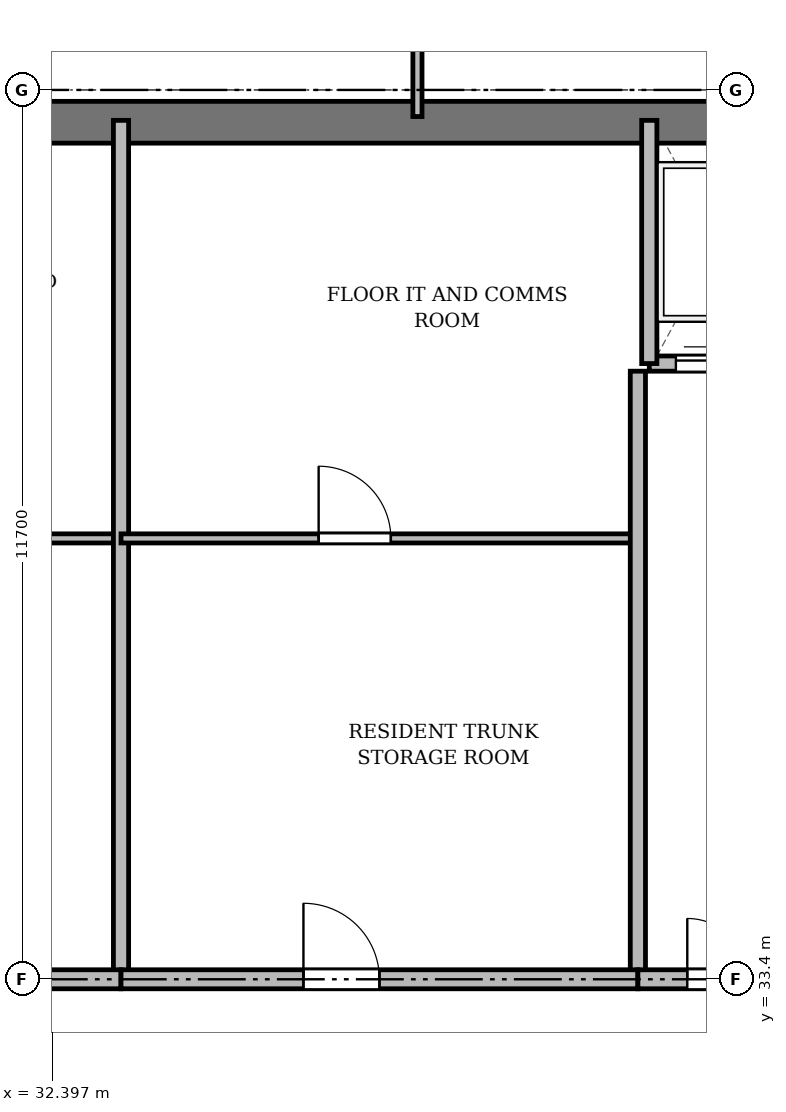
"""IFC4 building model, lengths in metres.
Left out: names, types, materials, properties, quantities, classifications, styles, units other than length and angle.
Written with IfcOpenShell. Run it as: python <this file> out.ifc"""

import sys

from ifc_helpers import new_model, si_unit, direction, frame, frame_2d, origin, place, context, subcontext, project, spatial, rectangle, extrude, source, transform, mapped, element, fill, save


model = new_model("IFC4")
c1 = context("Model", 3, precision=1e-05, world=origin(), true_north=direction((0.0, 1.0)))
c2 = subcontext(c1, "Body", "Model", "MODEL_VIEW")
j1 = project(units=[si_unit("LENGTHUNIT", "METRE"), si_unit("PLANEANGLEUNIT", "RADIAN")], contexts=[c1])
p1 = place(None, origin())
s1 = spatial("IfcSite", under=j1, at=p1, CompositionType="ELEMENT")
p2 = place(p1, origin())
s2 = spatial("IfcBuilding", under=s1, at=p2, CompositionType="ELEMENT")
p3 = place(p2, frame((0.0, 0.0, 230.1)))
s3 = spatial("IfcBuildingStorey", under=s2, at=p3, CompositionType="ELEMENT", Elevation=230.1)
p4 = place(p3, frame((15.65, 44.675, 0.0), z_axis=(0.0, 0.0, 1.0), x_axis=(1.0, 0.0, 0.0)))
e1 = element("IfcWall", 1, at=p4, inside=s3, PredefinedType="SHEAR", context=c2, shape_type="SweptSolid", body=[
    extrude(rectangle(XDim=43.1, YDim=0.55, at=frame_2d((21.55, 0.0))), origin(), (0.0, 0.0, 1.0), 3.36),
])
p5 = place(p3, frame((26.3, 39.2, 0.0), z_axis=(0.0, 0.0, 1.0), x_axis=(1.0, 0.0, 0.0)))
e2 = element("IfcWall", 2, at=p5, inside=s3, PredefinedType="PARTITIONING", context=c2, shape_type="SweptSolid", body=[
    extrude(rectangle(XDim=7.0, YDim=0.12, at=frame_2d((3.5, 0.0))), origin(), (0.0, 0.0, 1.0), 2.86),
])
p6 = place(p5, frame((2.6, 0.0, 0.0)))
e3 = element("IfcOpeningElement", 3, at=p6, cuts=e2, PredefinedType="OPENING", context=c2, shape_type="SweptSolid", body=[
    extrude(rectangle(XDim=0.95, YDim=2.15, at=frame_2d((0.475, 1.075))), frame((0.0, 0.07, 0.0), z_axis=(0.0, -1.0, 0.0), x_axis=(1.0, 0.0, 0.0)), (0.0, 0.0, 1.0), 0.14),
])
p7 = place(p3, frame((33.3, 33.4, 0.0), z_axis=(0.0, 0.0, 1.0), x_axis=(0.0, 1.0, 0.0)))
e4 = element("IfcWall", 4, at=p7, inside=s3, PredefinedType="SOLIDWALL", context=c2, shape_type="SweptSolid", body=[
    extrude(rectangle(XDim=11.3, YDim=0.2, at=frame_2d((5.65, 0.0))), origin(), (0.0, 0.0, 1.0), 2.91),
])
p8 = place(p3, frame((33.3, 39.2, 0.0), z_axis=(0.0, 0.0, 1.0), x_axis=(1.0, 0.0, 0.0)))
e5 = element("IfcWall", 5, at=p8, inside=s3, PredefinedType="PARTITIONING", context=c2, shape_type="SweptSolid", body=[
    extrude(rectangle(XDim=6.8, YDim=0.12, at=frame_2d((3.4, 0.0))), origin(), (0.0, 0.0, 1.0), 3.36),
])
p9 = place(p8, frame((2.6, 0.0, 0.0)))
e6 = element("IfcOpeningElement", 6, at=p9, cuts=e5, PredefinedType="OPENING", context=c2, shape_type="SweptSolid", body=[
    extrude(rectangle(XDim=0.95, YDim=2.15, at=frame_2d((0.475, 1.075))), frame((0.0, 0.07, 0.0), z_axis=(0.0, -1.0, 0.0), x_axis=(1.0, 0.0, 0.0)), (0.0, 0.0, 1.0), 0.14),
])
p10 = place(p3, frame((40.1, 33.4, 0.0), z_axis=(0.0, 0.0, 1.0), x_axis=(0.0, 1.0, 0.0)))
e7 = element("IfcWall", 7, at=p10, inside=s3, PredefinedType="SOLIDWALL", context=c2, shape_type="SweptSolid", body=[
    extrude(rectangle(XDim=8.0, YDim=0.2, at=frame_2d((4.0, 0.0))), origin(), (0.0, 0.0, 1.0), 2.91),
])
p11 = place(p3, frame((40.25, 41.5, 0.0), z_axis=(0.0, 0.0, 1.0), x_axis=(1.0, 0.0, 0.0)))
e8 = element("IfcWall", 8, at=p11, inside=s3, PredefinedType="SOLIDWALL", context=c2, shape_type="SweptSolid", body=[
    extrude(rectangle(XDim=6.9, YDim=0.2, at=frame_2d((3.45, 0.0))), origin(), (0.0, 0.0, 1.0), 3.36),
])
p12 = place(p11, frame((0.35, 0.0, 0.0)))
e9 = element("IfcOpeningElement", 9, at=p12, cuts=e8, PredefinedType="OPENING", context=c2, shape_type="SweptSolid", body=[
    extrude(rectangle(XDim=1.05, YDim=2.15, at=frame_2d((0.525, 1.075))), frame((0.0, 0.11, 0.0), z_axis=(0.0, -1.0, 0.0), x_axis=(1.0, 0.0, 0.0)), (0.0, 0.0, 1.0), 0.22),
])
p13 = place(p11, frame((2.05, 0.0, 0.0)))
e10 = element("IfcOpeningElement", 10, at=p13, cuts=e8, PredefinedType="OPENING", context=c2, shape_type="SweptSolid", body=[
    extrude(rectangle(XDim=1.05, YDim=2.15, at=frame_2d((0.525, 1.075))), frame((0.0, 0.11, 0.0), z_axis=(0.0, -1.0, 0.0), x_axis=(1.0, 0.0, 0.0)), (0.0, 0.0, 1.0), 0.22),
])
p14 = place(p11, frame((3.75, 0.0, 0.0)))
e11 = element("IfcOpeningElement", 11, at=p14, cuts=e8, PredefinedType="OPENING", context=c2, shape_type="SweptSolid", body=[
    extrude(rectangle(XDim=1.05, YDim=2.15, at=frame_2d((0.525, 1.075))), frame((0.0, 0.11, 0.0), z_axis=(0.0, -1.0, 0.0), x_axis=(1.0, 0.0, 0.0)), (0.0, 0.0, 1.0), 0.22),
])
p15 = place(p11, frame((5.45, 0.0, 0.0)))
e12 = element("IfcOpeningElement", 12, at=p15, cuts=e8, PredefinedType="OPENING", context=c2, shape_type="SweptSolid", body=[
    extrude(rectangle(XDim=1.05, YDim=2.15, at=frame_2d((0.525, 1.075))), frame((0.0, 0.11, 0.0), z_axis=(0.0, -1.0, 0.0), x_axis=(1.0, 0.0, 0.0)), (0.0, 0.0, 1.0), 0.22),
])
p16 = place(p3, frame((40.25, 41.5, 0.0), z_axis=(0.0, 0.0, 1.0), x_axis=(0.0, 1.0, 0.0)))
e13 = element("IfcWall", 13, at=p16, inside=s3, PredefinedType="SOLIDWALL", context=c2, shape_type="SweptSolid", body=[
    extrude(rectangle(XDim=3.2, YDim=0.2, at=frame_2d((1.6, 0.0))), origin(), (0.0, 0.0, 1.0), 3.36),
])
p17 = place(p3, frame((26.3, 33.4, 0.0), z_axis=(0.0, 0.0, 1.0), x_axis=(1.0, 0.0, 0.0)))
e14 = element("IfcWall", 14, at=p17, inside=s3, PredefinedType="PARTITIONING", context=c2, shape_type="SweptSolid", body=[
    extrude(rectangle(XDim=7.0, YDim=0.25, at=frame_2d((3.5, 0.0))), origin(), (0.0, 0.0, 1.0), 2.91),
])
p18 = place(p17, frame((1.35, 0.0, 0.0)))
e15 = element("IfcOpeningElement", 15, at=p18, cuts=e14, PredefinedType="OPENING", context=c2, shape_type="SweptSolid", body=[
    extrude(rectangle(XDim=0.95, YDim=2.15, at=frame_2d((0.475, 1.075))), frame((0.0, 0.135, 0.0), z_axis=(0.0, -1.0, 0.0), x_axis=(1.0, 0.0, 0.0)), (0.0, 0.0, 1.0), 0.27),
])
p19 = place(p3, frame((33.3, 33.4, 0.0), z_axis=(0.0, 0.0, 1.0), x_axis=(1.0, 0.0, 0.0)))
e16 = element("IfcWall", 16, at=p19, inside=s3, PredefinedType="PARTITIONING", context=c2, shape_type="SweptSolid", body=[
    extrude(rectangle(XDim=6.8, YDim=0.25, at=frame_2d((3.4, 0.0))), origin(), (0.0, 0.0, 1.0), 2.91),
])
p20 = place(p19, frame((2.4, 0.0, 0.0)))
e17 = element("IfcOpeningElement", 17, at=p20, cuts=e16, PredefinedType="OPENING", context=c2, shape_type="SweptSolid", body=[
    extrude(rectangle(XDim=1.0, YDim=2.15, at=frame_2d((0.5, 1.075))), frame((0.0, 0.135, 0.0), z_axis=(0.0, -1.0, 0.0), x_axis=(1.0, 0.0, 0.0)), (0.0, 0.0, 1.0), 0.27),
])
p21 = place(p3, frame((40.1, 33.4, 0.0), z_axis=(0.0, 0.0, 1.0), x_axis=(1.0, 0.0, 0.0)))
e18 = element("IfcWall", 18, at=p21, inside=s3, PredefinedType="PARTITIONING", context=c2, shape_type="SweptSolid", body=[
    extrude(rectangle(XDim=7.05, YDim=0.25, at=frame_2d((3.525, 0.0))), origin(), (0.0, 0.0, 1.0), 2.91),
])
p22 = place(p21, frame((0.65, 0.0, 0.0)))
e19 = element("IfcOpeningElement", 19, at=p22, cuts=e18, PredefinedType="OPENING", context=c2, shape_type="SweptSolid", body=[
    extrude(rectangle(XDim=1.6, YDim=2.2, at=frame_2d((0.8, 1.1))), frame((0.0, 0.135, 0.0), z_axis=(0.0, -1.0, 0.0), x_axis=(1.0, 0.0, 0.0)), (0.0, 0.0, 1.0), 0.27),
])
p23 = place(p3, frame((37.2, 44.75, 0.0), z_axis=(0.0, 0.0, 1.0), x_axis=(0.0, 1.0, 0.0)))
e20 = element("IfcWall", 20, at=p23, inside=s3, PredefinedType="PARTITIONING", context=c2, shape_type="SweptSolid", body=[
    extrude(rectangle(XDim=3.61, YDim=0.12, at=frame_2d((1.805, 0.0))), origin(), (0.0, 0.0, 1.0), 2.91),
])
p24 = place(p23, frame((1.1, 0.0, 0.0)))
e21 = element("IfcOpeningElement", 21, at=p24, cuts=e20, PredefinedType="OPENING", context=c2, shape_type="SweptSolid", body=[
    extrude(rectangle(XDim=0.95, YDim=2.15, at=frame_2d((0.475, 1.075))), frame((0.0, 0.07, 0.0), z_axis=(0.0, -1.0, 0.0), x_axis=(1.0, 0.0, 0.0)), (0.0, 0.0, 1.0), 0.14),
])
m1 = source(origin(), c2, "Body", "SweptSolid", [
    extrude(rectangle(XDim=0.95, YDim=2.15, at=frame_2d((0.475, 1.075))), frame((0.0, 0.025, 0.0), z_axis=(0.0, -1.0, 0.0), x_axis=(1.0, 0.0, 0.0)), (0.0, 0.0, 1.0), 0.05),
])
p25 = place(p9, origin())
e22 = element("IfcDoor", 22, at=p25, inside=s3, OperationType="SINGLE_SWING_LEFT", PredefinedType="DOOR", context=c2, shape_type="MappedRepresentation", body=[
    mapped(m1, transform((0.0, 0.0, 0.0), x_axis=(1.0, 0.0, 0.0), y_axis=(0.0, 1.0, 0.0), z_axis=(0.0, 0.0, 1.0), scale=1.0)),
])
fill(e6, e22)
m2 = source(origin(), c2, "Body", "SweptSolid", [
    extrude(rectangle(XDim=1.05, YDim=2.15, at=frame_2d((0.525, 1.075))), frame((0.0, 0.025, 0.0), z_axis=(0.0, -1.0, 0.0), x_axis=(1.0, 0.0, 0.0)), (0.0, 0.0, 1.0), 0.05),
])
p26 = place(p12, origin())
e23 = element("IfcDoor", 23, at=p26, inside=s3, OperationType="DOUBLE_DOOR_SLIDING", PredefinedType="DOOR", context=c2, shape_type="MappedRepresentation", body=[
    mapped(m2, transform((0.0, 0.0, 0.0), x_axis=(1.0, 0.0, 0.0), y_axis=(0.0, 1.0, 0.0), z_axis=(0.0, 0.0, 1.0), scale=1.0)),
])
fill(e9, e23)
m3 = source(origin(), c2, "Body", "SweptSolid", [
    extrude(rectangle(XDim=1.0, YDim=2.15, at=frame_2d((0.5, 1.075))), frame((0.0, 0.025, 0.0), z_axis=(0.0, -1.0, 0.0), x_axis=(1.0, 0.0, 0.0)), (0.0, 0.0, 1.0), 0.05),
])
p27 = place(p20, origin())
e24 = element("IfcDoor", 24, at=p27, inside=s3, OperationType="SINGLE_SWING_LEFT", PredefinedType="DOOR", context=c2, shape_type="MappedRepresentation", body=[
    mapped(m3, transform((0.0, 0.0, 0.0), x_axis=(1.0, 0.0, 0.0), y_axis=(0.0, 1.0, 0.0), z_axis=(0.0, 0.0, 1.0), scale=1.0)),
])
fill(e17, e24)
m4 = source(origin(), c2, "Body", "SweptSolid", [
    extrude(rectangle(XDim=1.6, YDim=2.2, at=frame_2d((0.8, 1.1))), frame((0.0, 0.025, 0.0), z_axis=(0.0, -1.0, 0.0), x_axis=(1.0, 0.0, 0.0)), (0.0, 0.0, 1.0), 0.05),
])
p28 = place(p22, origin())
e25 = element("IfcDoor", 25, at=p28, inside=s3, OperationType="DOUBLE_DOOR_SINGLE_SWING", PredefinedType="DOOR", context=c2, shape_type="MappedRepresentation", body=[
    mapped(m4, transform((0.0, 0.0, 0.0), x_axis=(1.0, 0.0, 0.0), y_axis=(0.0, 1.0, 0.0), z_axis=(0.0, 0.0, 1.0), scale=1.0)),
])
fill(e19, e25)
save(model, sys.argv[1])
